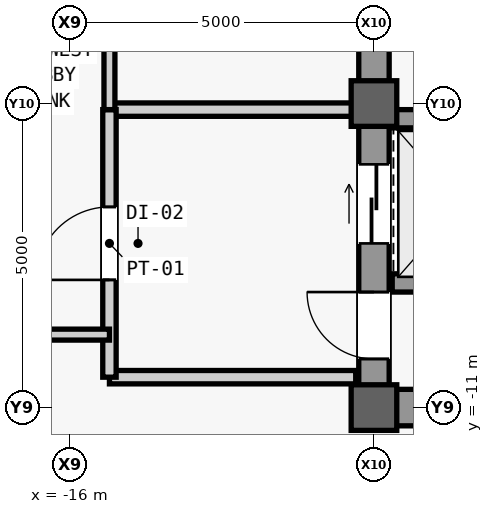
"""IFC4 building model, lengths in metres.
Left out: names, types, materials, properties, quantities, classifications, styles, units other than length and angle.
Written with IfcOpenShell. Run it as: python <this file> out.ifc"""

import sys

from ifc_helpers import new_model, si_unit, direction, frame, frame_2d, origin, origin_2d, place, context, subcontext, project, spatial, rectangle, extrude, source, transform, mapped, element, fill, save


model = new_model("IFC4")
c1 = context("Model", 3, precision=1e-05, world=origin(), true_north=direction((0.0, 1.0)))
c2 = subcontext(c1, "Body", "Model", "MODEL_VIEW")
j1 = project(units=[si_unit("LENGTHUNIT", "METRE"), si_unit("PLANEANGLEUNIT", "RADIAN")], contexts=[c1])
p1 = place(None, origin())
s1 = spatial("IfcSite", under=j1, at=p1, CompositionType="ELEMENT")
p2 = place(p1, origin())
s2 = spatial("IfcBuilding", under=s1, at=p2, CompositionType="ELEMENT")
p3 = place(p2, frame((0.0, 0.0, 273.5)))
s3 = spatial("IfcBuildingStorey", under=s2, at=p3, CompositionType="ELEMENT", Elevation=273.5)
m1 = source(origin(), c2, "Body", "SweptSolid", [
    extrude(rectangle(XDim=22.0, YDim=0.5, at=frame_2d((11.0, 0.0))), origin(), (0.0, 0.0, 1.0), 3.78),
])
p4 = place(p3, frame((-11.0, -11.0, 0.0), z_axis=(0.0, 0.0, 1.0), x_axis=(0.0, 1.0, 0.0)))
e1 = element("IfcWall", 1, at=p4, inside=s3, PredefinedType="SHEAR", context=c2, shape_type="MappedRepresentation", body=[
    mapped(m1, transform((0.0, 0.0, 0.0), scale=1.0)),
])
m2 = source(origin(), c2, "Body", "SweptSolid", [
    extrude(rectangle(XDim=1.1, YDim=2.2, at=frame_2d((0.55, 1.1))), frame((0.0, 0.26, 0.0), z_axis=(0.0, -1.0, 0.0), x_axis=(1.0, 0.0, 0.0)), (0.0, 0.0, 1.0), 0.52),
])
p5 = place(p4, frame((0.8, 0.0, 0.0)))
e2 = element("IfcOpeningElement", 2, at=p5, cuts=e1, PredefinedType="OPENING", context=c2, shape_type="MappedRepresentation", body=[
    mapped(m2, transform((0.0, 0.0, 0.0), scale=1.0)),
])
p6 = place(p4, frame((12.5, 0.0, 0.0)))
e3 = element("IfcOpeningElement", 3, at=p6, cuts=e1, PredefinedType="OPENING", context=c2, shape_type="MappedRepresentation", body=[
    mapped(m2, transform((0.0, 0.0, 0.0), scale=1.0)),
])
m3 = source(origin(), c2, "Body", "SweptSolid", [
    extrude(rectangle(XDim=0.9, YDim=2.15, at=frame_2d((0.45, 1.075))), frame((0.0, 0.26, 0.0), z_axis=(0.0, -1.0, 0.0), x_axis=(1.0, 0.0, 0.0)), (0.0, 0.0, 1.0), 0.52),
])
p7 = place(p4, frame((6.2, 0.0, 0.0)))
e4 = element("IfcOpeningElement", 4, at=p7, cuts=e1, PredefinedType="OPENING", context=c2, shape_type="MappedRepresentation", body=[
    mapped(m3, transform((0.0, 0.0, 0.0), scale=1.0)),
])
p8 = place(p4, frame((8.05, 0.0, 0.0)))
e5 = element("IfcOpeningElement", 5, at=p8, cuts=e1, PredefinedType="OPENING", context=c2, shape_type="MappedRepresentation", body=[
    mapped(m3, transform((0.0, 0.0, 0.0), scale=1.0)),
])
m4 = source(origin(), c2, "Body", "SweptSolid", [
    extrude(rectangle(XDim=1.2, YDim=2.3, at=frame_2d((0.6, 1.15))), frame((0.0, 0.26, 0.0), z_axis=(0.0, -1.0, 0.0), x_axis=(1.0, 0.0, 0.0)), (0.0, 0.0, 1.0), 0.52),
])
p9 = place(p4, frame((14.6, 0.0, 0.0)))
e6 = element("IfcOpeningElement", 6, at=p9, cuts=e1, PredefinedType="OPENING", context=c2, shape_type="MappedRepresentation", body=[
    mapped(m4, transform((0.0, 0.0, 0.0), scale=1.0)),
])
p10 = place(p4, frame((18.2, 0.0, 0.0)))
e7 = element("IfcOpeningElement", 7, at=p10, cuts=e1, PredefinedType="OPENING", context=c2, shape_type="MappedRepresentation", body=[
    mapped(m4, transform((0.0, 0.0, 0.0), scale=1.0)),
])
m5 = source(origin(), c2, "Body", "SweptSolid", [
    extrude(rectangle(XDim=1.3, YDim=2.3, at=frame_2d((0.65, 1.15))), frame((0.0, 0.26, 0.0), z_axis=(0.0, -1.0, 0.0), x_axis=(1.0, 0.0, 0.0)), (0.0, 0.0, 1.0), 0.52),
])
p11 = place(p4, frame((2.7, 0.0, 0.0)))
e8 = element("IfcOpeningElement", 8, at=p11, cuts=e1, PredefinedType="OPENING", context=c2, shape_type="MappedRepresentation", body=[
    mapped(m5, transform((0.0, 0.0, 0.0), scale=1.0)),
])
m6 = source(origin(), c2, "Body", "SweptSolid", [
    extrude(rectangle(XDim=5.9, YDim=0.6, at=frame_2d((2.95, 0.0))), origin(), (0.0, 0.0, 1.0), 3.78),
])
p12 = place(p3, frame((-10.75, -11.0, 0.0), z_axis=(0.0, 0.0, 1.0), x_axis=(1.0, 0.0, 0.0)))
e9 = element("IfcWall", 9, at=p12, inside=s3, PredefinedType="SHEAR", context=c2, shape_type="MappedRepresentation", body=[
    mapped(m6, transform((0.0, 0.0, 0.0), scale=1.0)),
])
m7 = source(origin(), c2, "Body", "SweptSolid", [
    extrude(rectangle(XDim=0.75, YDim=0.75, at=origin_2d()), origin(), (0.0, 0.0, 1.0), 4.0),
])
for number, where, z_axis, x_axis in (
    (10, (-11.0, -11.0, 0.0), (0.0, 0.0, 1.0), (1.0, 0.0, 0.0)),
    (11, (-11.0, -6.0, 0.0), (0.0, 0.0, 1.0), (1.0, 0.0, 0.0)),
):
    element("IfcColumn", number, at=place(p3, frame(where, z_axis=z_axis, x_axis=x_axis)), inside=s3, PredefinedType="COLUMN", context=c2, shape_type="MappedRepresentation", body=[
        mapped(m7, transform((0.0, 0.0, 0.0), scale=1.0)),
    ])
m8 = source(origin(), c2, "Body", "SweptSolid", [
    extrude(rectangle(XDim=2.2, YDim=0.3, at=frame_2d((1.1, 0.0))), origin(), (0.0, 0.0, 1.0), 3.78),
])
for number, where, z_axis, x_axis in (
    (12, (-10.7, -8.95, 0.0), (0.0, 0.0, 1.0), (1.0, 0.0, 0.0)),
    (13, (-10.7, -6.25, 0.0), (0.0, 0.0, 1.0), (1.0, 0.0, 0.0)),
):
    element("IfcWall", number, at=place(p3, frame(where, z_axis=z_axis, x_axis=x_axis)), inside=s3, PredefinedType="SHEAR", context=c2, shape_type="MappedRepresentation", body=[
        mapped(m8, transform((0.0, 0.0, 0.0), scale=1.0)),
    ])
m9 = source(origin(), c2, "Body", "SweptSolid", [
    extrude(rectangle(XDim=4.05, YDim=0.22, at=frame_2d((2.025, 0.0))), origin(), (0.0, 0.0, 1.0), 3.78),
])
p13 = place(p3, frame((-15.35, -10.5, 0.0), z_axis=(0.0, 0.0, 1.0), x_axis=(1.0, 0.0, 0.0)))
e14 = element("IfcWall", 14, at=p13, inside=s3, PredefinedType="PARTITIONING", context=c2, shape_type="MappedRepresentation", body=[
    mapped(m9, transform((0.0, 0.0, 0.0), scale=1.0)),
])
m10 = source(origin(), c2, "Body", "SweptSolid", [
    extrude(rectangle(XDim=4.05, YDim=0.22, at=frame_2d((2.025, 0.0))), origin(), (0.0, 0.0, 1.0), 3.085),
])
p14 = place(p3, frame((-15.35, -6.1, 0.0), z_axis=(0.0, 0.0, 1.0), x_axis=(1.0, 0.0, 0.0)))
e15 = element("IfcWall", 15, at=p14, inside=s3, PredefinedType="PARTITIONING", context=c2, shape_type="MappedRepresentation", body=[
    mapped(m10, transform((0.0, 0.0, 0.0), scale=1.0)),
])
m11 = source(origin(), c2, "Body", "SweptSolid", [
    extrude(rectangle(XDim=4.4, YDim=0.22, at=frame_2d((2.2, 0.0))), origin(), (0.0, 0.0, 1.0), 3.78),
])
p15 = place(p3, frame((-15.35, -10.5, 0.0), z_axis=(0.0, 0.0, 1.0), x_axis=(0.0, 1.0, 0.0)))
e16 = element("IfcWall", 16, at=p15, inside=s3, PredefinedType="PARTITIONING", context=c2, shape_type="MappedRepresentation", body=[
    mapped(m11, transform((0.0, 0.0, 0.0), scale=1.0)),
])
m12 = source(origin(), c2, "Body", "SweptSolid", [
    extrude(rectangle(XDim=1.2, YDim=2.2, at=frame_2d((0.6, 1.1))), frame((0.0, 0.12, 0.0), z_axis=(0.0, -1.0, 0.0), x_axis=(1.0, 0.0, 0.0)), (0.0, 0.0, 1.0), 0.24),
])
p16 = place(p15, frame((1.6, 0.0, 0.0)))
e17 = element("IfcOpeningElement", 17, at=p16, cuts=e16, PredefinedType="OPENING", context=c2, shape_type="MappedRepresentation", body=[
    mapped(m12, transform((0.0, 0.0, 0.0), scale=1.0)),
])
m13 = source(origin(), c2, "Body", "SweptSolid", [
    extrude(rectangle(XDim=16.6, YDim=0.18, at=frame_2d((8.3, 0.0))), origin(), (0.0, 0.0, 1.0), 3.78),
])
p17 = place(p3, frame((-15.35, -6.1, 0.0), z_axis=(0.0, 0.0, 1.0), x_axis=(0.0, 1.0, 0.0)))
e18 = element("IfcWall", 18, at=p17, inside=s3, PredefinedType="PARTITIONING", context=c2, shape_type="MappedRepresentation", body=[
    mapped(m13, transform((0.0, 0.0, 0.0), scale=1.0)),
])
m14 = source(origin(), c2, "Body", "SweptSolid", [
    extrude(rectangle(XDim=1.8, YDim=2.25, at=frame_2d((0.9, 1.125))), frame((0.0, 0.1, 0.0), z_axis=(0.0, -1.0, 0.0), x_axis=(1.0, 0.0, 0.0)), (0.0, 0.0, 1.0), 0.2),
])
p18 = place(p17, frame((2.7, 0.0, 0.0)))
e19 = element("IfcOpeningElement", 19, at=p18, cuts=e18, PredefinedType="OPENING", context=c2, shape_type="MappedRepresentation", body=[
    mapped(m14, transform((0.0, 0.0, 0.0), scale=1.0)),
])
p19 = place(p17, frame((11.0, 0.0, 0.0)))
e20 = element("IfcOpeningElement", 20, at=p19, cuts=e18, PredefinedType="OPENING", context=c2, shape_type="MappedRepresentation", body=[
    mapped(m14, transform((0.0, 0.0, 0.0), scale=1.0)),
])
m15 = source(origin(), c2, "Body", "SweptSolid", [
    extrude(rectangle(XDim=2.05, YDim=0.18, at=frame_2d((1.025, 0.0))), origin(), (0.0, 0.0, 1.0), 3.78),
])
p20 = place(p3, frame((-17.4, -9.8, 0.0), z_axis=(0.0, 0.0, 1.0), x_axis=(1.0, 0.0, 0.0)))
e21 = element("IfcWall", 21, at=p20, inside=s3, PredefinedType="PARTITIONING", context=c2, shape_type="MappedRepresentation", body=[
    mapped(m15, transform((0.0, 0.0, 0.0), scale=1.0)),
])
m16 = source(origin(), c2, "Body", "SweptSolid", [
    extrude(rectangle(XDim=1.1, YDim=2.2, at=frame_2d((0.55, 1.1))), frame((0.0, 0.025, 0.0), z_axis=(0.0, -1.0, 0.0), x_axis=(1.0, 0.0, 0.0)), (0.0, 0.0, 1.0), 0.05),
])
p21 = place(p5, origin())
e22 = element("IfcDoor", 22, at=p21, inside=s3, OperationType="SINGLE_SWING_RIGHT", PredefinedType="DOOR", context=c2, shape_type="MappedRepresentation", body=[
    mapped(m16, transform((0.0, 0.0, 0.0), scale=1.0)),
])
fill(e2, e22)
m17 = source(origin(), c2, "Body", "SweptSolid", [
    extrude(rectangle(XDim=1.2, YDim=2.2, at=frame_2d((0.6, 1.1))), frame((0.0, 0.025, 0.0), z_axis=(0.0, -1.0, 0.0), x_axis=(1.0, 0.0, 0.0)), (0.0, 0.0, 1.0), 0.05),
])
p22 = place(p16, origin())
e23 = element("IfcDoor", 23, at=p22, inside=s3, OperationType="SINGLE_SWING_LEFT", PredefinedType="DOOR", context=c2, shape_type="MappedRepresentation", body=[
    mapped(m17, transform((0.0, 0.0, 0.0), scale=1.0)),
])
fill(e17, e23)
m18 = source(origin(), c2, "Body", "SweptSolid", [
    extrude(rectangle(XDim=1.3, YDim=2.3, at=frame_2d((0.65, 1.15))), frame((0.0, 0.025, 0.0), z_axis=(0.0, -1.0, 0.0), x_axis=(1.0, 0.0, 0.0)), (0.0, 0.0, 1.0), 0.05),
])
p23 = place(p11, origin())
e24 = element("IfcDoor", 24, at=p23, inside=s3, OperationType="SLIDING_TO_LEFT", PredefinedType="DOOR", context=c2, shape_type="MappedRepresentation", body=[
    mapped(m18, transform((0.0, 0.0, 0.0), scale=1.0)),
])
fill(e8, e24)
save(model, sys.argv[1])
